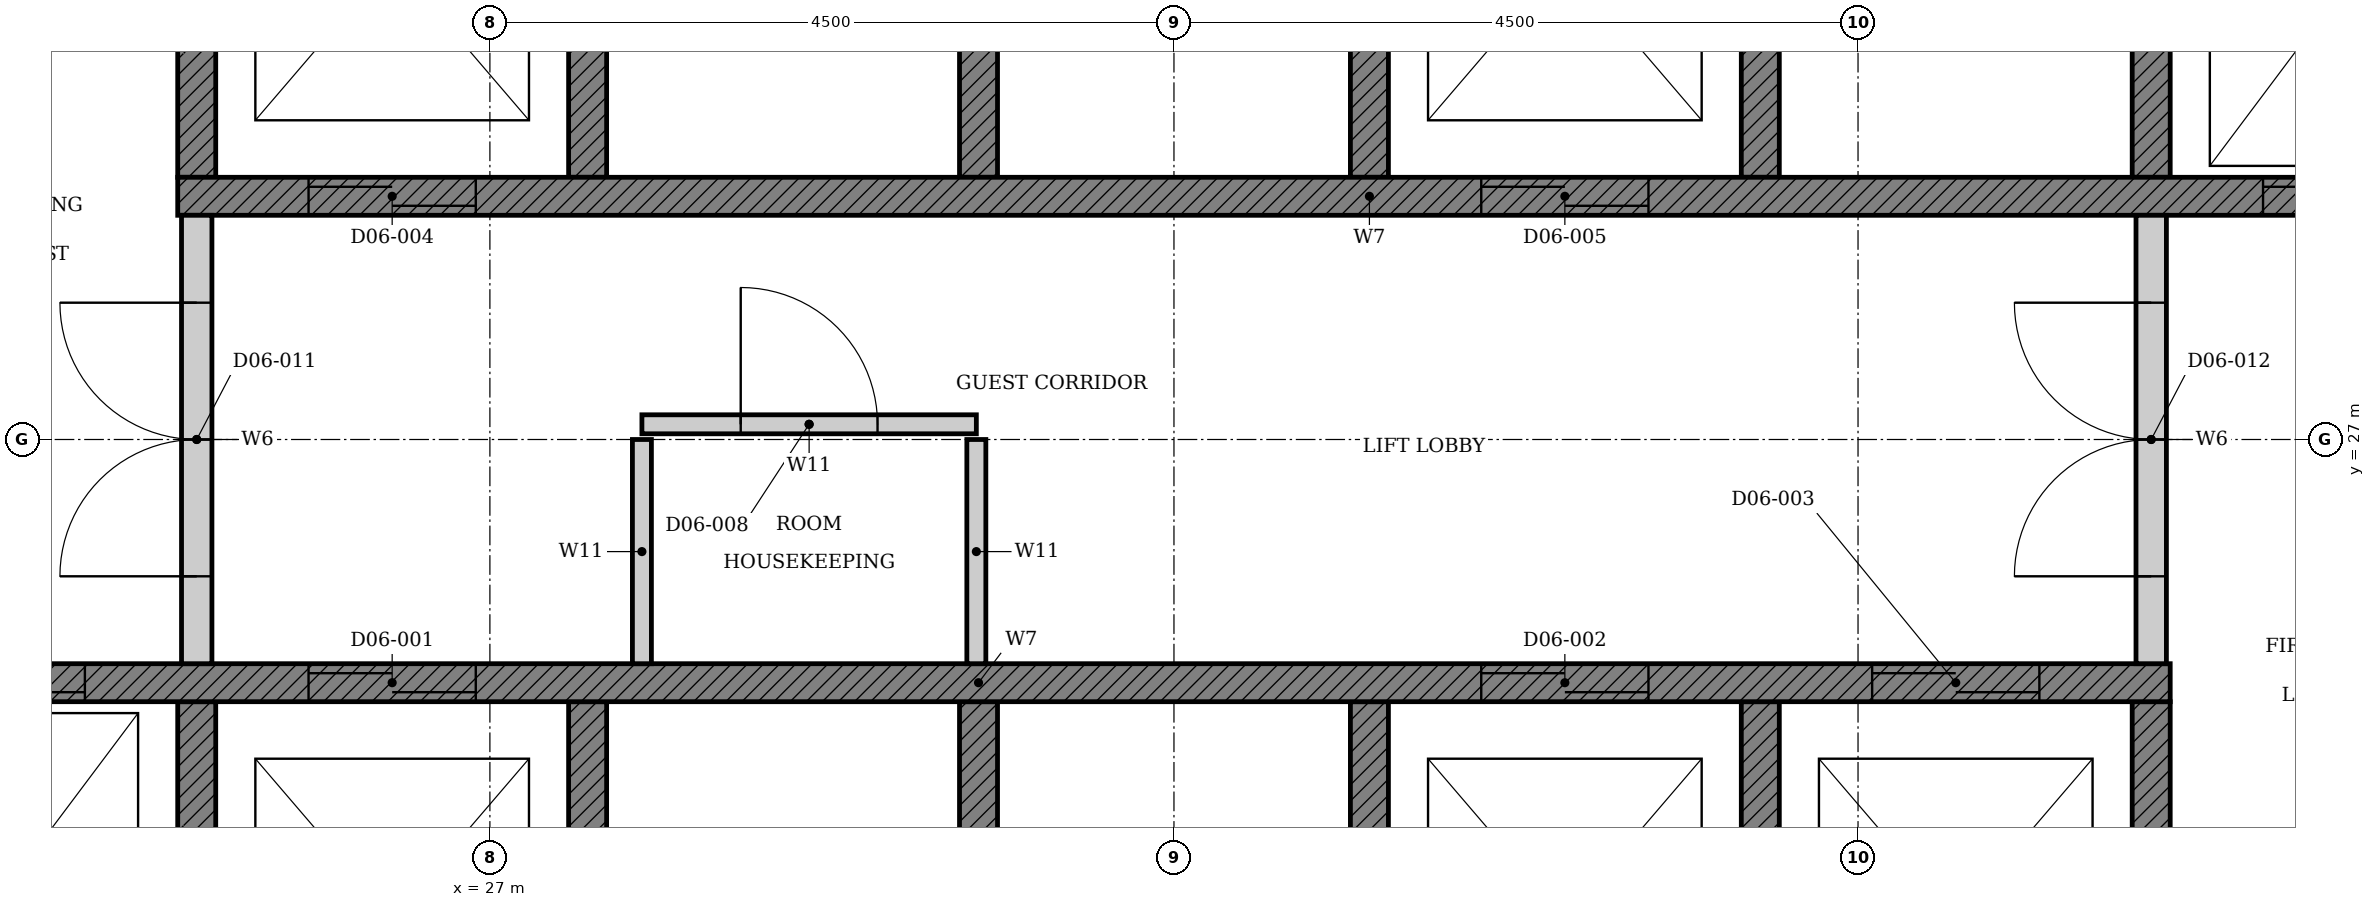
"""IFC4 building model, lengths in metres.
Left out: names, types, materials, properties, quantities, classifications, styles, units other than length and angle.
Written with IfcOpenShell. Run it as: python <this file> out.ifc"""

import sys

from ifc_helpers import new_model, si_unit, direction, frame, frame_2d, origin, place, context, subcontext, project, spatial, polyline, rectangle, outline, extrude, element, fill, save


model = new_model("IFC4")
c1 = context("Model", 3, precision=1e-05, world=origin(), true_north=direction((0.0, 1.0)))
c2 = subcontext(c1, "Body", "Model", "MODEL_VIEW")
j1 = project(units=[si_unit("LENGTHUNIT", "METRE"), si_unit("PLANEANGLEUNIT", "RADIAN")], contexts=[c1])
p1 = place(None, origin())
s1 = spatial("IfcSite", under=j1, at=p1, CompositionType="ELEMENT")
p2 = place(p1, origin())
s2 = spatial("IfcBuilding", under=s1, at=p2, CompositionType="ELEMENT")
p3 = place(p2, frame((0.0, 0.0, 33.6)))
s3 = spatial("IfcBuildingStorey", under=s2, at=p3, CompositionType="ELEMENT", Elevation=33.6)
p4 = place(p3, origin())
e1 = element("IfcWall", 1, at=p4, inside=s3, PredefinedType="SHEAR", context=c2, shape_type="SweptSolid", body=[
    extrude(outline(polyline([(22.375, 22.35), (38.053, 22.35), (38.053, 25.275), (37.803, 25.275), (37.803, 22.65), (35.482, 22.65), (35.482, 25.275), (35.232, 25.275), (35.232, 22.65), (32.911, 22.65), (32.911, 25.275), (32.661, 25.275), (32.661, 22.65), (30.339, 22.65), (30.339, 25.275), (30.089, 25.275), (30.089, 22.65), (27.768, 22.65), (27.768, 25.275), (27.518, 25.275), (27.518, 22.65), (25.197, 22.65), (25.197, 25.275), (24.947, 25.275), (24.947, 22.65), (22.625, 22.65), (22.625, 25.275), (22.375, 25.275), (22.375, 22.35)])), origin(), (0.0, 0.0, 1.0), 3.3),
])
p5 = place(p3, origin())
e2 = element("IfcWall", 2, at=p5, inside=s3, PredefinedType="SHEAR", context=c2, shape_type="SweptSolid", body=[
    extrude(outline(polyline([(24.947, 28.725), (25.197, 28.725), (25.197, 31.35), (27.518, 31.35), (27.518, 28.725), (27.768, 28.725), (27.768, 31.35), (30.089, 31.35), (30.089, 28.725), (30.339, 28.725), (30.339, 31.35), (32.661, 31.35), (32.661, 28.725), (32.911, 28.725), (32.911, 31.35), (35.232, 31.35), (35.232, 28.725), (35.482, 28.725), (35.482, 31.35), (37.803, 31.35), (37.803, 28.725), (38.053, 28.725), (38.053, 31.35), (40.375, 31.35), (40.375, 28.725), (40.625, 28.725), (40.625, 31.65), (24.947, 31.65), (24.947, 28.725)])), origin(), (0.0, 0.0, 1.0), 3.3),
])
p6 = place(p3, frame((22.375, 25.4, 0.0), z_axis=(0.0, 0.0, 1.0), x_axis=(1.0, 0.0, 0.0)))
e3 = element("IfcWall", 3, at=p6, inside=s3, PredefinedType="SHEAR", context=c2, shape_type="SweptSolid", body=[
    extrude(rectangle(XDim=15.678, YDim=0.25, at=frame_2d((7.839, 0.0))), origin(), (0.0, 0.0, 1.0), 3.3),
])
p7 = place(p6, frame((3.432, 0.0, 0.0)))
e4 = element("IfcOpeningElement", 4, at=p7, cuts=e3, PredefinedType="OPENING", context=c2, shape_type="SweptSolid", body=[
    extrude(rectangle(XDim=1.1, YDim=2.1, at=frame_2d((0.55, 1.05))), frame((0.0, 0.135, 0.0), z_axis=(0.0, -1.0, 0.0), x_axis=(1.0, 0.0, 0.0)), (0.0, 0.0, 1.0), 0.27),
])
p8 = place(p6, frame((11.146, 0.0, 0.0)))
e5 = element("IfcOpeningElement", 5, at=p8, cuts=e3, PredefinedType="OPENING", context=c2, shape_type="SweptSolid", body=[
    extrude(rectangle(XDim=1.1, YDim=2.1, at=frame_2d((0.55, 1.05))), frame((0.0, 0.135, 0.0), z_axis=(0.0, -1.0, 0.0), x_axis=(1.0, 0.0, 0.0)), (0.0, 0.0, 1.0), 0.27),
])
p9 = place(p6, frame((13.718, 0.0, 0.0)))
e6 = element("IfcOpeningElement", 6, at=p9, cuts=e3, PredefinedType="OPENING", context=c2, shape_type="SweptSolid", body=[
    extrude(rectangle(XDim=1.1, YDim=2.1, at=frame_2d((0.55, 1.05))), frame((0.0, 0.135, 0.0), z_axis=(0.0, -1.0, 0.0), x_axis=(1.0, 0.0, 0.0)), (0.0, 0.0, 1.0), 0.27),
])
p10 = place(p6, frame((0.861, 0.0, 0.0)))
e7 = element("IfcOpeningElement", 7, at=p10, cuts=e3, PredefinedType="OPENING", context=c2, shape_type="SweptSolid", body=[
    extrude(rectangle(XDim=1.1, YDim=2.1, at=frame_2d((0.55, 1.05))), frame((0.0, 0.135, 0.0), z_axis=(0.0, -1.0, 0.0), x_axis=(1.0, 0.0, 0.0)), (0.0, 0.0, 1.0), 0.27),
])
p11 = place(p3, frame((24.947, 28.6, 0.0), z_axis=(0.0, 0.0, 1.0), x_axis=(1.0, 0.0, 0.0)))
e8 = element("IfcWall", 8, at=p11, inside=s3, PredefinedType="SHEAR", context=c2, shape_type="SweptSolid", body=[
    extrude(rectangle(XDim=15.678, YDim=0.25, at=frame_2d((7.839, 0.0))), origin(), (0.0, 0.0, 1.0), 3.3),
])
p12 = place(p11, frame((0.861, 0.0, 0.0)))
e9 = element("IfcOpeningElement", 9, at=p12, cuts=e8, PredefinedType="OPENING", context=c2, shape_type="SweptSolid", body=[
    extrude(rectangle(XDim=1.1, YDim=2.1, at=frame_2d((0.55, 1.05))), frame((0.0, 0.135, 0.0), z_axis=(0.0, -1.0, 0.0), x_axis=(1.0, 0.0, 0.0)), (0.0, 0.0, 1.0), 0.27),
])
p13 = place(p11, frame((8.575, 0.0, 0.0)))
e10 = element("IfcOpeningElement", 10, at=p13, cuts=e8, PredefinedType="OPENING", context=c2, shape_type="SweptSolid", body=[
    extrude(rectangle(XDim=1.1, YDim=2.1, at=frame_2d((0.55, 1.05))), frame((0.0, 0.135, 0.0), z_axis=(0.0, -1.0, 0.0), x_axis=(1.0, 0.0, 0.0)), (0.0, 0.0, 1.0), 0.27),
])
p14 = place(p11, frame((13.718, 0.0, 0.0)))
e11 = element("IfcOpeningElement", 11, at=p14, cuts=e8, PredefinedType="OPENING", context=c2, shape_type="SweptSolid", body=[
    extrude(rectangle(XDim=1.1, YDim=2.1, at=frame_2d((0.55, 1.05))), frame((0.0, 0.135, 0.0), z_axis=(0.0, -1.0, 0.0), x_axis=(1.0, 0.0, 0.0)), (0.0, 0.0, 1.0), 0.27),
])
p15 = place(p3, frame((28.0, 27.1, 0.0), z_axis=(0.0, 0.0, 1.0), x_axis=(1.0, 0.0, 0.0)))
e12 = element("IfcWall", 12, at=p15, inside=s3, PredefinedType="PARTITIONING", context=c2, shape_type="SweptSolid", body=[
    extrude(rectangle(XDim=2.2, YDim=0.125, at=frame_2d((1.1, 0.0))), origin(), (0.0, 0.0, 1.0), 3.3),
])
p16 = place(p15, frame((0.65, 0.0, 0.0)))
e13 = element("IfcOpeningElement", 13, at=p16, cuts=e12, PredefinedType="OPENING", context=c2, shape_type="SweptSolid", body=[
    extrude(rectangle(XDim=0.9, YDim=2.1, at=frame_2d((0.45, 1.05))), frame((0.0, 0.073, 0.0), z_axis=(0.0, -1.0, 0.0), x_axis=(1.0, 0.0, 0.0)), (0.0, 0.0, 1.0), 0.145),
])
for number, where, z_axis, x_axis in (
    (14, (28.0, 25.525, 0.0), (0.0, 0.0, 1.0), (0.0, 1.0, 0.0)),
    (15, (30.2, 25.525, 0.0), (0.0, 0.0, 1.0), (0.0, 1.0, 0.0)),
):
    element("IfcWall", number, at=place(p3, frame(where, z_axis=z_axis, x_axis=x_axis)), inside=s3, PredefinedType="PARTITIONING", context=c2, shape_type="SweptSolid", body=[
        extrude(rectangle(XDim=1.475, YDim=0.125, at=frame_2d((0.738, 0.0))), origin(), (0.0, 0.0, 1.0), 3.3),
    ])
p17 = place(p3, frame((25.072, 25.525, 0.0), z_axis=(0.0, 0.0, 1.0), x_axis=(0.0, 1.0, 0.0)))
e16 = element("IfcWall", 16, at=p17, inside=s3, PredefinedType="PARTITIONING", context=c2, shape_type="SweptSolid", body=[
    extrude(rectangle(XDim=2.95, YDim=0.2, at=frame_2d((1.475, 0.0))), origin(), (0.0, 0.0, 1.0), 3.3),
])
p18 = place(p17, frame((0.575, 0.0, 0.0)))
e17 = element("IfcOpeningElement", 17, at=p18, cuts=e16, PredefinedType="OPENING", context=c2, shape_type="SweptSolid", body=[
    extrude(rectangle(XDim=1.8, YDim=2.1, at=frame_2d((0.9, 1.05))), frame((0.0, 0.11, 0.0), z_axis=(0.0, -1.0, 0.0), x_axis=(1.0, 0.0, 0.0)), (0.0, 0.0, 1.0), 0.22),
])
p19 = place(p3, frame((37.928, 25.525, 0.0), z_axis=(0.0, 0.0, 1.0), x_axis=(0.0, 1.0, 0.0)))
e18 = element("IfcWall", 18, at=p19, inside=s3, PredefinedType="PARTITIONING", context=c2, shape_type="SweptSolid", body=[
    extrude(rectangle(XDim=2.95, YDim=0.2, at=frame_2d((1.475, 0.0))), origin(), (0.0, 0.0, 1.0), 3.3),
])
p20 = place(p19, frame((0.575, 0.0, 0.0)))
e19 = element("IfcOpeningElement", 19, at=p20, cuts=e18, PredefinedType="OPENING", context=c2, shape_type="SweptSolid", body=[
    extrude(rectangle(XDim=1.8, YDim=2.1, at=frame_2d((0.9, 1.05))), frame((0.0, 0.11, 0.0), z_axis=(0.0, -1.0, 0.0), x_axis=(1.0, 0.0, 0.0)), (0.0, 0.0, 1.0), 0.22),
])
p21 = place(p7, origin())
e20 = element("IfcDoor", 20, at=p21, inside=s3, OperationType="DOUBLE_DOOR_SLIDING", PredefinedType="DOOR", context=c2, shape_type="SweptSolid", body=[
    extrude(rectangle(XDim=1.1, YDim=2.1, at=frame_2d((0.55, 1.05))), frame((0.0, 0.025, 0.0), z_axis=(0.0, -1.0, 0.0), x_axis=(1.0, 0.0, 0.0)), (0.0, 0.0, 1.0), 0.05),
])
fill(e4, e20)
p22 = place(p8, origin())
e21 = element("IfcDoor", 21, at=p22, inside=s3, OperationType="DOUBLE_DOOR_SLIDING", PredefinedType="DOOR", context=c2, shape_type="SweptSolid", body=[
    extrude(rectangle(XDim=1.1, YDim=2.1, at=frame_2d((0.55, 1.05))), frame((0.0, 0.025, 0.0), z_axis=(0.0, -1.0, 0.0), x_axis=(1.0, 0.0, 0.0)), (0.0, 0.0, 1.0), 0.05),
])
fill(e5, e21)
p23 = place(p9, origin())
e22 = element("IfcDoor", 22, at=p23, inside=s3, OperationType="DOUBLE_DOOR_SLIDING", PredefinedType="DOOR", context=c2, shape_type="SweptSolid", body=[
    extrude(rectangle(XDim=1.1, YDim=2.1, at=frame_2d((0.55, 1.05))), frame((0.0, 0.025, 0.0), z_axis=(0.0, -1.0, 0.0), x_axis=(1.0, 0.0, 0.0)), (0.0, 0.0, 1.0), 0.05),
])
fill(e6, e22)
p24 = place(p12, origin())
e23 = element("IfcDoor", 23, at=p24, inside=s3, OperationType="DOUBLE_DOOR_SLIDING", PredefinedType="DOOR", context=c2, shape_type="SweptSolid", body=[
    extrude(rectangle(XDim=1.1, YDim=2.1, at=frame_2d((0.55, 1.05))), frame((0.0, 0.025, 0.0), z_axis=(0.0, -1.0, 0.0), x_axis=(1.0, 0.0, 0.0)), (0.0, 0.0, 1.0), 0.05),
])
fill(e9, e23)
p25 = place(p13, origin())
e24 = element("IfcDoor", 24, at=p25, inside=s3, OperationType="DOUBLE_DOOR_SLIDING", PredefinedType="DOOR", context=c2, shape_type="SweptSolid", body=[
    extrude(rectangle(XDim=1.1, YDim=2.1, at=frame_2d((0.55, 1.05))), frame((0.0, 0.025, 0.0), z_axis=(0.0, -1.0, 0.0), x_axis=(1.0, 0.0, 0.0)), (0.0, 0.0, 1.0), 0.05),
])
fill(e10, e24)
p26 = place(p10, origin())
e25 = element("IfcDoor", 25, at=p26, inside=s3, OperationType="DOUBLE_DOOR_SLIDING", PredefinedType="DOOR", context=c2, shape_type="SweptSolid", body=[
    extrude(rectangle(XDim=1.1, YDim=2.1, at=frame_2d((0.55, 1.05))), frame((0.0, 0.025, 0.0), z_axis=(0.0, -1.0, 0.0), x_axis=(1.0, 0.0, 0.0)), (0.0, 0.0, 1.0), 0.05),
])
fill(e7, e25)
p27 = place(p14, origin())
e26 = element("IfcDoor", 26, at=p27, inside=s3, OperationType="DOUBLE_DOOR_SLIDING", PredefinedType="DOOR", context=c2, shape_type="SweptSolid", body=[
    extrude(rectangle(XDim=1.1, YDim=2.1, at=frame_2d((0.55, 1.05))), frame((0.0, 0.025, 0.0), z_axis=(0.0, -1.0, 0.0), x_axis=(1.0, 0.0, 0.0)), (0.0, 0.0, 1.0), 0.05),
])
fill(e11, e26)
p28 = place(p16, origin())
e27 = element("IfcDoor", 27, at=p28, inside=s3, OperationType="SINGLE_SWING_LEFT", PredefinedType="DOOR", context=c2, shape_type="SweptSolid", body=[
    extrude(rectangle(XDim=0.9, YDim=2.1, at=frame_2d((0.45, 1.05))), frame((0.0, 0.025, 0.0), z_axis=(0.0, -1.0, 0.0), x_axis=(1.0, 0.0, 0.0)), (0.0, 0.0, 1.0), 0.05),
])
fill(e13, e27)
p29 = place(p18, origin())
e28 = element("IfcDoor", 28, at=p29, inside=s3, OperationType="DOUBLE_DOOR_SINGLE_SWING", PredefinedType="DOOR", context=c2, shape_type="SweptSolid", body=[
    extrude(rectangle(XDim=1.8, YDim=2.1, at=frame_2d((0.9, 1.05))), frame((0.0, 0.025, 0.0), z_axis=(0.0, -1.0, 0.0), x_axis=(1.0, 0.0, 0.0)), (0.0, 0.0, 1.0), 0.05),
])
fill(e17, e28)
p30 = place(p20, origin())
e29 = element("IfcDoor", 29, at=p30, inside=s3, OperationType="DOUBLE_DOOR_SINGLE_SWING", PredefinedType="DOOR", context=c2, shape_type="SweptSolid", body=[
    extrude(rectangle(XDim=1.8, YDim=2.1, at=frame_2d((0.9, 1.05))), frame((0.0, 0.025, 0.0), z_axis=(0.0, -1.0, 0.0), x_axis=(1.0, 0.0, 0.0)), (0.0, 0.0, 1.0), 0.05),
])
fill(e19, e29)
save(model, sys.argv[1])
